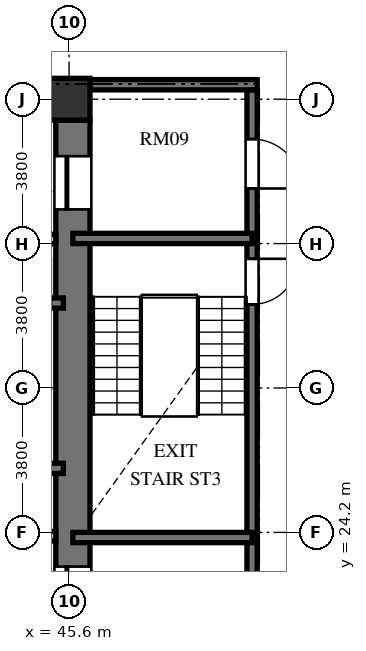
"""IFC4 building model, lengths in metres.
Left out: names, types, materials, properties, quantities, classifications, styles, units other than length and angle.
Written with IfcOpenShell. Run it as: python <this file> out.ifc"""

import sys

from ifc_helpers import new_model, si_unit, direction, frame, frame_2d, origin, origin_2d, place, context, subcontext, project, spatial, rectangle, extrude, element, fill, save


model = new_model("IFC4")
c1 = context("Model", 3, precision=1e-05, world=origin(), true_north=direction((0.0, 1.0)))
c2 = subcontext(c1, "Body", "Model", "MODEL_VIEW")
j1 = project(units=[si_unit("LENGTHUNIT", "METRE"), si_unit("PLANEANGLEUNIT", "RADIAN")], contexts=[c1])
p1 = place(None, origin())
s1 = spatial("IfcSite", under=j1, at=p1, CompositionType="ELEMENT")
p2 = place(p1, origin())
s2 = spatial("IfcBuilding", under=s1, at=p2, CompositionType="ELEMENT")
p3 = place(p2, frame((0.0, 0.0, 61.68)))
s3 = spatial("IfcBuildingStorey", under=s2, at=p3, CompositionType="ELEMENT", Elevation=61.68)
p4 = place(p3, frame((45.6, 35.6, 0.0), z_axis=(0.0, 0.0, 1.0), x_axis=(1.0, 0.0, 0.0)))
e1 = element("IfcColumn", 1, at=p4, inside=s3, PredefinedType="COLUMN", context=c2, shape_type="SweptSolid", body=[
    extrude(rectangle(XDim=1.1, YDim=1.1, at=origin_2d()), origin(), (0.0, 0.0, 1.0), 3.648),
])
p5 = place(p3, frame((45.7, 20.95, 0.0), z_axis=(0.0, 0.0, 1.0), x_axis=(0.0, 1.0, 0.0)))
e2 = element("IfcWall", 2, at=p5, inside=s3, PredefinedType="SHEAR", context=c2, shape_type="SweptSolid", body=[
    extrude(rectangle(XDim=14.1, YDim=0.9, at=frame_2d((7.05, 0.0))), origin(), (0.0, 0.0, 1.0), 3.648),
])
p6 = place(p5, frame((11.75, 0.0, 0.0)))
e3 = element("IfcOpeningElement", 3, at=p6, cuts=e2, PredefinedType="OPENING", context=c2, shape_type="SweptSolid", body=[
    extrude(rectangle(XDim=1.4, YDim=2.3, at=frame_2d((0.7, 1.15))), frame((0.0, 0.46, 0.0), z_axis=(0.0, -1.0, 0.0), x_axis=(1.0, 0.0, 0.0)), (0.0, 0.0, 1.0), 0.92),
])
p7 = place(p5, frame((0.95, 0.0, 0.0)))
e4 = element("IfcOpeningElement", 4, at=p7, cuts=e2, PredefinedType="OPENING", context=c2, shape_type="SweptSolid", body=[
    extrude(rectangle(XDim=1.4, YDim=2.3, at=frame_2d((0.7, 1.15))), frame((0.0, 0.46, 0.0), z_axis=(0.0, -1.0, 0.0), x_axis=(1.0, 0.0, 0.0)), (0.0, 0.0, 1.0), 0.92),
])
p8 = place(p3, frame((37.465, 30.235, 0.0), z_axis=(0.0, 0.0, 1.0), x_axis=(1.0, 0.0, 0.0)))
e5 = element("IfcWall", 5, at=p8, inside=s3, PredefinedType="SHEAR", context=c2, shape_type="SweptSolid", body=[
    extrude(rectangle(XDim=7.985, YDim=0.27, at=frame_2d((3.992, 0.0))), origin(), (0.0, 0.0, 1.0), 3.648),
])
p9 = place(p8, frame((6.455, 0.0, 0.0)))
e6 = element("IfcOpeningElement", 6, at=p9, cuts=e5, PredefinedType="OPENING", context=c2, shape_type="SweptSolid", body=[
    extrude(rectangle(XDim=1.2, YDim=2.15, at=frame_2d((0.6, 1.075))), frame((0.0, 0.145, 0.0), z_axis=(0.0, -1.0, 0.0), x_axis=(1.0, 0.0, 0.0)), (0.0, 0.0, 1.0), 0.29),
])
p10 = place(p3, frame((37.465, 25.885, 0.0), z_axis=(0.0, 0.0, 1.0), x_axis=(1.0, 0.0, 0.0)))
e7 = element("IfcWall", 7, at=p10, inside=s3, PredefinedType="SHEAR", context=c2, shape_type="SweptSolid", body=[
    extrude(rectangle(XDim=7.985, YDim=0.27, at=frame_2d((3.992, 0.0))), origin(), (0.0, 0.0, 1.0), 3.648),
])
for number, where, z_axis, x_axis in (
    (8, (42.95, 31.92, 0.0), (0.0, 0.0, 1.0), (1.0, 0.0, 0.0)),
    (9, (42.95, 24.1, 0.0), (0.0, 0.0, 1.0), (1.0, 0.0, 0.0)),
):
    element("IfcWall", number, at=place(p3, frame(where, z_axis=z_axis, x_axis=x_axis)), inside=s3, PredefinedType="SOLIDWALL", context=c2, shape_type="SweptSolid", body=[
        extrude(rectangle(XDim=2.3, YDim=0.25, at=frame_2d((1.15, 0.0))), origin(), (0.0, 0.0, 1.0), 3.428),
    ])
p11 = place(p3, frame((50.415, 35.845, 0.0), z_axis=(0.0, 0.0, 1.0), x_axis=(0.0, -1.0, 0.0)))
e10 = element("IfcWall", 10, at=p11, inside=s3, PredefinedType="SHEAR", context=c2, shape_type="SweptSolid", body=[
    extrude(rectangle(XDim=15.825, YDim=0.27, at=frame_2d((7.913, 0.0))), origin(), (0.0, 0.0, 1.0), 3.648),
])
p12 = place(p11, frame((4.445, 0.0, 0.0)))
e11 = element("IfcOpeningElement", 11, at=p12, cuts=e10, PredefinedType="OPENING", context=c2, shape_type="SweptSolid", body=[
    extrude(rectangle(XDim=1.2, YDim=2.15, at=frame_2d((0.6, 1.075))), frame((0.0, 0.145, 0.0), z_axis=(0.0, -1.0, 0.0), x_axis=(1.0, 0.0, 0.0)), (0.0, 0.0, 1.0), 0.29),
])
p13 = place(p11, frame((1.295, 0.0, 0.0)))
e12 = element("IfcOpeningElement", 12, at=p13, cuts=e10, PredefinedType="OPENING", context=c2, shape_type="SweptSolid", body=[
    extrude(rectangle(XDim=1.3, YDim=2.2, at=frame_2d((0.65, 1.1))), frame((0.0, 0.145, 0.0), z_axis=(0.0, -1.0, 0.0), x_axis=(1.0, 0.0, 0.0)), (0.0, 0.0, 1.0), 0.29),
])
p14 = place(p11, frame((13.095, 0.0, 0.0)))
e13 = element("IfcOpeningElement", 13, at=p14, cuts=e10, PredefinedType="OPENING", context=c2, shape_type="SweptSolid", body=[
    extrude(rectangle(XDim=1.3, YDim=2.2, at=frame_2d((0.65, 1.1))), frame((0.0, 0.145, 0.0), z_axis=(0.0, -1.0, 0.0), x_axis=(1.0, 0.0, 0.0)), (0.0, 0.0, 1.0), 0.29),
])
p15 = place(p3, frame((46.15, 35.98, 0.0), z_axis=(0.0, 0.0, 1.0), x_axis=(1.0, 0.0, 0.0)))
e14 = element("IfcWall", 14, at=p15, inside=s3, PredefinedType="SHEAR", context=c2, shape_type="SweptSolid", body=[
    extrude(rectangle(XDim=4.4, YDim=0.27, at=frame_2d((2.2, 0.0))), origin(), (0.0, 0.0, 1.0), 3.648),
])
for number, where, z_axis, x_axis in (
    (15, (45.7, 31.935, 0.0), (0.0, 0.0, 1.0), (1.0, 0.0, 0.0)),
    (16, (45.7, 24.065, 0.0), (0.0, 0.0, 1.0), (1.0, 0.0, 0.0)),
):
    element("IfcWall", number, at=place(p3, frame(where, z_axis=z_axis, x_axis=x_axis)), inside=s3, PredefinedType="SHEAR", context=c2, shape_type="SweptSolid", body=[
        extrude(rectangle(XDim=4.715, YDim=0.27, at=frame_2d((2.357, 0.0))), origin(), (0.0, 0.0, 1.0), 3.648),
    ])
p16 = place(p6, origin())
e17 = element("IfcDoor", 17, at=p16, inside=s3, OperationType="SLIDING_TO_LEFT", PredefinedType="DOOR", context=c2, shape_type="SweptSolid", body=[
    extrude(rectangle(XDim=1.4, YDim=2.3, at=frame_2d((0.7, 1.15))), frame((0.0, 0.025, 0.0), z_axis=(0.0, -1.0, 0.0), x_axis=(1.0, 0.0, 0.0)), (0.0, 0.0, 1.0), 0.05),
])
fill(e3, e17)
p17 = place(p7, origin())
e18 = element("IfcDoor", 18, at=p17, inside=s3, OperationType="SLIDING_TO_LEFT", PredefinedType="DOOR", context=c2, shape_type="SweptSolid", body=[
    extrude(rectangle(XDim=1.4, YDim=2.3, at=frame_2d((0.7, 1.15))), frame((0.0, 0.025, 0.0), z_axis=(0.0, -1.0, 0.0), x_axis=(1.0, 0.0, 0.0)), (0.0, 0.0, 1.0), 0.05),
])
fill(e4, e18)
p18 = place(p12, origin())
e19 = element("IfcDoor", 19, at=p18, inside=s3, OperationType="SINGLE_SWING_LEFT", PredefinedType="DOOR", context=c2, shape_type="SweptSolid", body=[
    extrude(rectangle(XDim=1.2, YDim=2.15, at=frame_2d((0.6, 1.075))), frame((0.0, 0.025, 0.0), z_axis=(0.0, -1.0, 0.0), x_axis=(1.0, 0.0, 0.0)), (0.0, 0.0, 1.0), 0.05),
])
fill(e11, e19)
p19 = place(p13, origin())
e20 = element("IfcDoor", 20, at=p19, inside=s3, OperationType="SINGLE_SWING_RIGHT", PredefinedType="DOOR", context=c2, shape_type="SweptSolid", body=[
    extrude(rectangle(XDim=1.3, YDim=2.2, at=frame_2d((0.65, 1.1))), frame((0.0, 0.025, 0.0), z_axis=(0.0, -1.0, 0.0), x_axis=(1.0, 0.0, 0.0)), (0.0, 0.0, 1.0), 0.05),
])
fill(e12, e20)
save(model, sys.argv[1])
